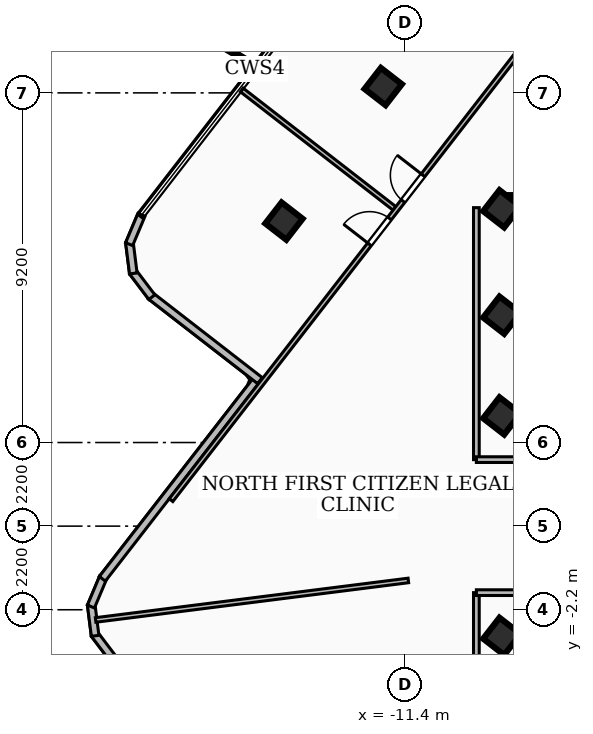
"""IFC4 building model, lengths in metres.
Left out: names, types, materials, properties, quantities, classifications, styles, units other than length and angle.
Written with IfcOpenShell. Run it as: python <this file> out.ifc"""

import sys

from ifc_helpers import new_model, si_unit, direction, frame, frame_2d, origin, origin_2d, place, context, subcontext, project, spatial, rectangle, extrude, element, fill, save


model = new_model("IFC4")
c1 = context("Model", 3, precision=1e-05, world=origin(), true_north=direction((0.0, 1.0)))
c2 = subcontext(c1, "Body", "Model", "MODEL_VIEW")
j1 = project(units=[si_unit("LENGTHUNIT", "METRE"), si_unit("PLANEANGLEUNIT", "RADIAN")], contexts=[c1])
p1 = place(None, origin())
s1 = spatial("IfcSite", under=j1, at=p1, CompositionType="ELEMENT")
p2 = place(p1, origin())
s2 = spatial("IfcBuilding", under=s1, at=p2, CompositionType="ELEMENT")
p3 = place(p2, frame((0.0, 0.0, 261.18)))
s3 = spatial("IfcBuildingStorey", under=s2, at=p3, CompositionType="ELEMENT", Elevation=261.18)
p4 = place(p3, frame((-8.78, 8.51, 0.0), z_axis=(0.0, 0.0, 1.0), x_axis=(1.0, 0.0, 0.0)))
e1 = element("IfcWall", 1, at=p4, inside=s3, PredefinedType="SHEAR", context=c2, shape_type="SweptSolid", body=[
    extrude(rectangle(XDim=17.56, YDim=0.4, at=frame_2d((8.78, 0.0))), origin(), (0.0, 0.0, 1.0), 3.16),
])
for number, where, z_axis, x_axis in (
    (2, (-8.85, -2.9, 0.0), (0.0, 0.0, 1.0), (0.613, 0.79, 0.0)),
    (3, (-8.85, 2.9, 0.0), (0.0, 0.0, 1.0), (0.613, 0.79, 0.0)),
    (4, (-8.85, 5.55, 0.0), (0.0, 0.0, 1.0), (0.613, 0.79, 0.0)),
    (5, (-8.85, 8.35, 0.0), (0.0, 0.0, 1.0), (0.613, 0.79, 0.0)),
    (6, (-11.971, 11.566, 0.0), (0.0, 0.0, 1.0), (0.613, 0.79, 0.0)),
    (7, (-14.583, 8.026, 0.0), (0.0, 0.0, 1.0), (0.613, 0.79, 0.0)),
):
    element("IfcColumn", number, at=place(p3, frame(where, z_axis=z_axis, x_axis=x_axis)), inside=s3, PredefinedType="COLUMN", context=c2, shape_type="SweptSolid", body=[
        extrude(rectangle(XDim=0.7, YDim=0.7, at=origin_2d()), origin(), (0.0, 0.0, 1.0), 3.42),
    ])
p5 = place(p3, frame((-19.064, -3.509, 0.0), z_axis=(0.0, 0.0, 1.0), x_axis=(-0.603908166539, 0.797053904317, 0.0)))
e8 = element("IfcWall", 8, at=p5, inside=s3, PredefinedType="SOLIDWALL", context=c2, shape_type="SweptSolid", body=[
    extrude(rectangle(XDim=0.838, YDim=0.2, at=frame_2d((0.419, 0.0))), origin(), (0.0, 0.0, 1.0), 3.16),
])
p6 = place(p3, frame((-19.552, -2.886, 0.0), z_axis=(0.0, 0.0, 1.0), x_axis=(-0.124799052175, 0.992182038023, 0.0)))
e9 = element("IfcWall", 9, at=p6, inside=s3, PredefinedType="SOLIDWALL", context=c2, shape_type="SweptSolid", body=[
    extrude(rectangle(XDim=0.825, YDim=0.2, at=frame_2d((0.413, 0.0))), origin(), (0.0, 0.0, 1.0), 3.16),
])
p7 = place(p3, frame((-19.662, -2.115, 0.0), z_axis=(0.0, 0.0, 1.0), x_axis=(0.388213349612, 0.921569528133, 0.0)))
e10 = element("IfcWall", 10, at=p7, inside=s3, PredefinedType="SOLIDWALL", context=c2, shape_type="SweptSolid", body=[
    extrude(rectangle(XDim=0.838, YDim=0.2, at=frame_2d((0.419, 0.0))), origin(), (0.0, 0.0, 1.0), 3.16),
])
p8 = place(p3, frame((-19.362, -1.386, 0.0), z_axis=(0.0, 0.0, 1.0), x_axis=(0.613007625303, 0.790076990755, 0.0)))
e11 = element("IfcWall", 11, at=p8, inside=s3, PredefinedType="SOLIDWALL", context=c2, shape_type="SweptSolid", body=[
    extrude(rectangle(XDim=6.742, YDim=0.2, at=frame_2d((3.371, 0.0))), origin(), (0.0, 0.0, 1.0), 3.16),
])
p9 = place(p3, frame((-15.215, 3.829, 0.0), z_axis=(0.0, 0.0, 1.0), x_axis=(-0.790311198889, 0.612705646221, 0.0)))
e12 = element("IfcWall", 12, at=p9, inside=s3, PredefinedType="SOLIDWALL", context=c2, shape_type="SweptSolid", body=[
    extrude(rectangle(XDim=3.643, YDim=0.2, at=frame_2d((1.821, 0.0))), origin(), (0.0, 0.0, 1.0), 3.16),
])
p10 = place(p3, frame((-18.059, 6.026, 0.0), z_axis=(0.0, 0.0, 1.0), x_axis=(-0.603582833373, 0.797300296787, 0.0)))
e13 = element("IfcWall", 13, at=p10, inside=s3, PredefinedType="SOLIDWALL", context=c2, shape_type="SweptSolid", body=[
    extrude(rectangle(XDim=0.838, YDim=0.2, at=frame_2d((0.419, 0.0))), origin(), (0.0, 0.0, 1.0), 3.16),
])
p11 = place(p3, frame((-18.547, 6.649, 0.0), z_axis=(0.0, 0.0, 1.0), x_axis=(-0.124507909692, 0.992218615238, 0.0)))
e14 = element("IfcWall", 14, at=p11, inside=s3, PredefinedType="SOLIDWALL", context=c2, shape_type="SweptSolid", body=[
    extrude(rectangle(XDim=0.825, YDim=0.2, at=frame_2d((0.413, 0.0))), origin(), (0.0, 0.0, 1.0), 3.16),
])
p12 = place(p3, frame((-18.657, 7.42, 0.0), z_axis=(0.0, 0.0, 1.0), x_axis=(0.387965780676, 0.921673777985, 0.0)))
e15 = element("IfcWall", 15, at=p12, inside=s3, PredefinedType="SOLIDWALL", context=c2, shape_type="SweptSolid", body=[
    extrude(rectangle(XDim=0.838, YDim=0.2, at=frame_2d((0.419, 0.0))), origin(), (0.0, 0.0, 1.0), 3.16),
])
p13 = place(p3, frame((-9.52, 1.75, 0.0), z_axis=(0.0, 0.0, 1.0), x_axis=(0.0, 1.0, 0.0)))
e16 = element("IfcWall", 16, at=p13, inside=s3, PredefinedType="PARTITIONING", context=c2, shape_type="SweptSolid", body=[
    extrude(rectangle(XDim=6.63, YDim=0.15, at=frame_2d((3.315, 0.0))), origin(), (0.0, 0.0, 1.0), 2.53),
])
p14 = place(p3, frame((-7.85, 1.75, 0.0), z_axis=(0.0, 0.0, 1.0), x_axis=(-1.0, 0.0, 0.0)))
e17 = element("IfcWall", 17, at=p14, inside=s3, PredefinedType="PARTITIONING", context=c2, shape_type="SweptSolid", body=[
    extrude(rectangle(XDim=1.67, YDim=0.15, at=frame_2d((0.835, 0.0))), origin(), (0.0, 0.0, 1.0), 2.39),
])
p15 = place(p3, frame((-9.52, -8.38, 0.0), z_axis=(0.0, 0.0, 1.0), x_axis=(0.0, 1.0, 0.0)))
e18 = element("IfcWall", 18, at=p15, inside=s3, PredefinedType="PARTITIONING", context=c2, shape_type="SweptSolid", body=[
    extrude(rectangle(XDim=6.63, YDim=0.15, at=frame_2d((3.315, 0.0))), origin(), (0.0, 0.0, 1.0), 3.16),
])
p16 = place(p3, frame((-7.85, -1.75, 0.0), z_axis=(0.0, 0.0, 1.0), x_axis=(-1.0, 0.0, 0.0)))
e19 = element("IfcWall", 19, at=p16, inside=s3, PredefinedType="PARTITIONING", context=c2, shape_type="SweptSolid", body=[
    extrude(rectangle(XDim=1.67, YDim=0.15, at=frame_2d((0.835, 0.0))), origin(), (0.0, 0.0, 1.0), 2.39),
])
p17 = place(p3, frame((-11.31, -1.429, 0.0), z_axis=(0.0, 0.0, 1.0), x_axis=(-0.992107592132, -0.125389495712, 0.0)))
e20 = element("IfcWall", 20, at=p17, inside=s3, PredefinedType="PARTITIONING", context=c2, shape_type="SweptSolid", body=[
    extrude(rectangle(XDim=8.294, YDim=0.12, at=frame_2d((4.147, 0.0))), origin(), (0.0, 0.0, 1.0), 3.16),
])
p18 = place(p3, frame((-11.676, 8.361, 0.0), z_axis=(0.0, 0.0, 1.0), x_axis=(-0.790227868115, 0.612813117071, 0.0)))
e21 = element("IfcWall", 21, at=p18, inside=s3, PredefinedType="PARTITIONING", context=c2, shape_type="SweptSolid", body=[
    extrude(rectangle(XDim=5.085, YDim=0.12, at=frame_2d((2.542, 0.0))), origin(), (0.0, 0.0, 1.0), 3.16),
])
p19 = place(p3, frame((-17.555, 0.683, 0.0), z_axis=(0.0, 0.0, 1.0), x_axis=(0.61291959311, 0.790145285617, 0.0)))
e22 = element("IfcWall", 22, at=p19, inside=s3, PredefinedType="PARTITIONING", context=c2, shape_type="SweptSolid", body=[
    extrude(rectangle(XDim=20.239, YDim=0.12, at=frame_2d((10.12, 0.0))), origin(), (0.0, 0.0, 1.0), 2.53),
])
p20 = place(p19, frame((9.96, 0.0, 0.0)))
e23 = element("IfcOpeningElement", 23, at=p20, cuts=e22, PredefinedType="OPENING", context=c2, shape_type="SweptSolid", body=[
    extrude(rectangle(XDim=0.86, YDim=2.04, at=frame_2d((0.43, 1.02))), frame((0.0, 0.07, 0.0), z_axis=(0.0, -1.0, 0.0), x_axis=(1.0, 0.0, 0.0)), (0.0, 0.0, 1.0), 0.14),
])
p21 = place(p19, frame((8.52, 0.0, 0.0)))
e24 = element("IfcOpeningElement", 24, at=p21, cuts=e22, PredefinedType="OPENING", context=c2, shape_type="SweptSolid", body=[
    extrude(rectangle(XDim=0.86, YDim=2.04, at=frame_2d((0.43, 1.02))), frame((0.0, 0.07, 0.0), z_axis=(0.0, -1.0, 0.0), x_axis=(1.0, 0.0, 0.0)), (0.0, 0.0, 1.0), 0.14),
])
p22 = place(p20, origin())
e25 = element("IfcDoor", 25, at=p22, inside=s3, OperationType="SINGLE_SWING_RIGHT", PredefinedType="DOOR", context=c2, shape_type="SweptSolid", body=[
    extrude(rectangle(XDim=0.86, YDim=2.04, at=frame_2d((0.43, 1.02))), frame((0.0, 0.025, 0.0), z_axis=(0.0, -1.0, 0.0), x_axis=(1.0, 0.0, 0.0)), (0.0, 0.0, 1.0), 0.05),
])
fill(e23, e25)
p23 = place(p21, origin())
e26 = element("IfcDoor", 26, at=p23, inside=s3, OperationType="SINGLE_SWING_LEFT", PredefinedType="DOOR", context=c2, shape_type="SweptSolid", body=[
    extrude(rectangle(XDim=0.86, YDim=2.04, at=frame_2d((0.43, 1.02))), frame((0.0, 0.025, 0.0), z_axis=(0.0, -1.0, 0.0), x_axis=(1.0, 0.0, 0.0)), (0.0, 0.0, 1.0), 0.05),
])
fill(e24, e26)
save(model, sys.argv[1])
